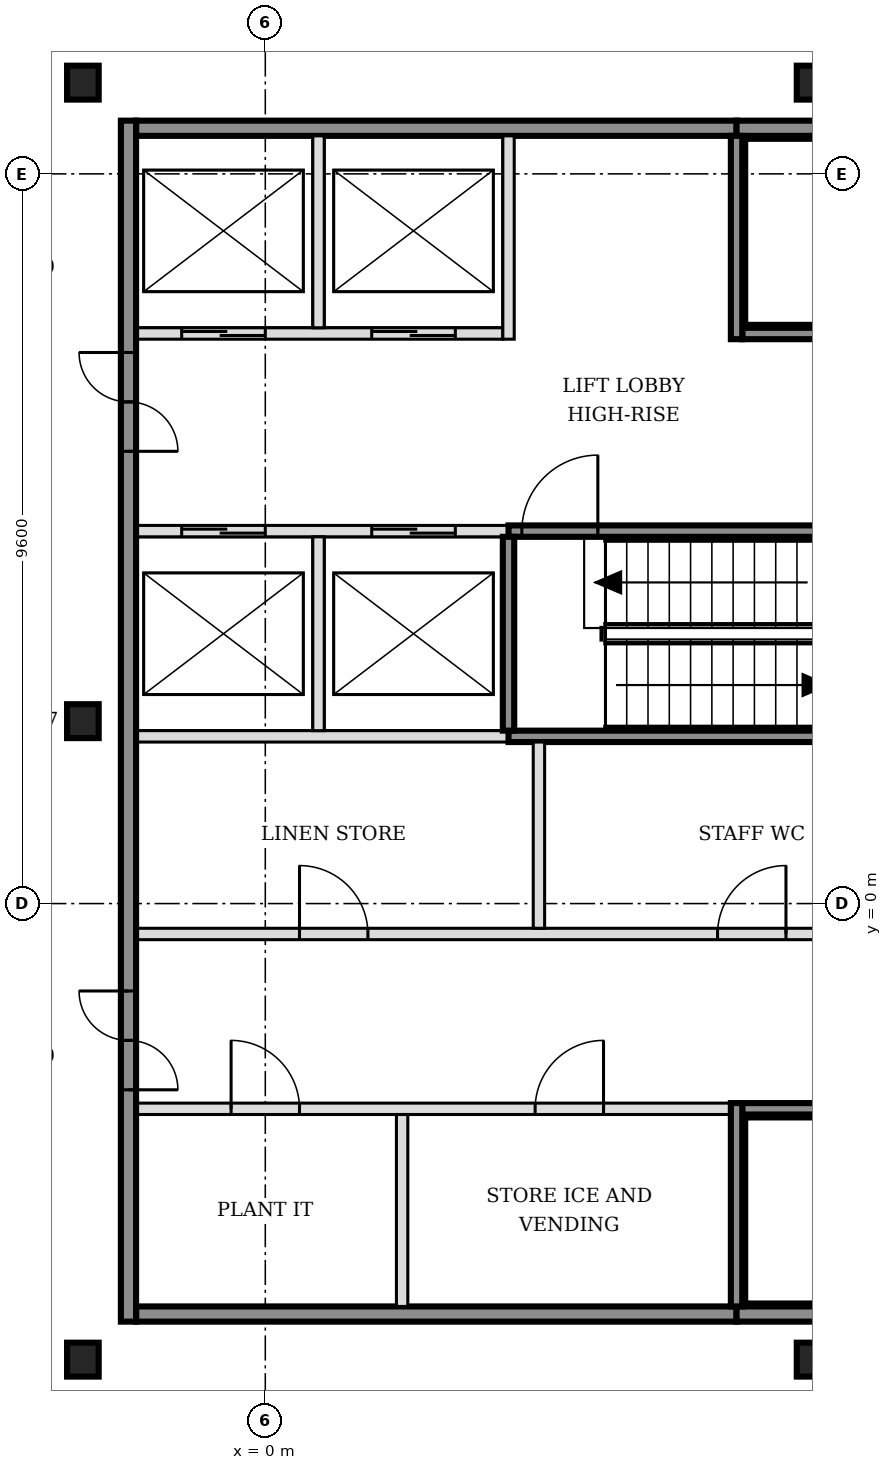
"""IFC4 building model, lengths in metres.
Left out: names, types, materials, properties, quantities, classifications, styles, units other than length and angle.
Written with IfcOpenShell. Run it as: python <this file> out.ifc"""

import sys

from ifc_helpers import new_model, si_unit, direction, frame, frame_2d, origin, origin_2d, place, context, subcontext, project, spatial, rectangle, i_section, extrude, element, fill, save


model = new_model("IFC4")
c1 = context("Model", 3, precision=1e-05, world=origin(), true_north=direction((0.0, 1.0)))
c2 = subcontext(c1, "Body", "Model", "MODEL_VIEW")
j1 = project(units=[si_unit("LENGTHUNIT", "METRE"), si_unit("PLANEANGLEUNIT", "RADIAN")], contexts=[c1])
p1 = place(None, origin())
s1 = spatial("IfcSite", under=j1, at=p1, CompositionType="ELEMENT")
p2 = place(p1, origin())
s2 = spatial("IfcBuilding", under=s1, at=p2, CompositionType="ELEMENT")
p3 = place(p2, frame((0.0, 0.0, 165.0)))
s3 = spatial("IfcBuildingStorey", under=s2, at=p3, CompositionType="ELEMENT", Elevation=165.0)
for number, where, z_axis, x_axis in (
    (1, (-2.4, -6.0, -0.15), (0.0, 0.0, 1.0), (1.0, 0.0, 0.0)),
    (2, (7.2, -6.0, -0.15), (0.0, 0.0, 1.0), (1.0, 0.0, 0.0)),
    (3, (-2.4, 2.4, -0.15), (0.0, 0.0, 1.0), (1.0, 0.0, 0.0)),
    (4, (-2.4, 10.8, -0.15), (0.0, 0.0, 1.0), (1.0, 0.0, 0.0)),
    (5, (7.2, 10.8, -0.15), (0.0, 0.0, 1.0), (1.0, 0.0, 0.0)),
):
    element("IfcColumn", number, at=place(p3, frame(where, z_axis=z_axis, x_axis=x_axis)), inside=s3, PredefinedType="COLUMN", context=c2, shape_type="SweptSolid", body=[
        extrude(i_section(OverallWidth=0.416, OverallDepth=0.446, WebThickness=0.039, FlangeThickness=0.063, FilletRadius=0.015, at=origin_2d()), origin(), (0.0, 0.0, 1.0), 3.6),
    ])
p4 = place(p3, frame((-1.7, -5.4, 0.0), z_axis=(0.0, 0.0, 1.0), x_axis=(1.0, 0.0, 0.0)))
e6 = element("IfcWall", 6, at=p4, inside=s3, PredefinedType="SOLIDWALL", context=c2, shape_type="SweptSolid", body=[
    extrude(rectangle(XDim=7.9, YDim=0.2, at=frame_2d((3.95, 0.0))), origin(), (0.0, 0.0, 1.0), 3.45),
])
p5 = place(p3, frame((6.2, -5.4, 0.0), z_axis=(0.0, 0.0, 1.0), x_axis=(1.0, 0.0, 0.0)))
e7 = element("IfcWall", 7, at=p5, inside=s3, PredefinedType="SOLIDWALL", context=c2, shape_type="SweptSolid", body=[
    extrude(rectangle(XDim=6.5, YDim=0.2, at=frame_2d((3.25, 0.0))), origin(), (0.0, 0.0, 1.0), 3.45),
])
p6 = place(p3, frame((-1.7, -2.7, 0.0), z_axis=(0.0, 0.0, 1.0), x_axis=(1.0, 0.0, 0.0)))
e8 = element("IfcWall", 8, at=p6, inside=s3, PredefinedType="PARTITIONING", context=c2, shape_type="SweptSolid", body=[
    extrude(rectangle(XDim=7.825, YDim=0.15, at=frame_2d((3.913, 0.0))), origin(), (0.0, 0.0, 1.0), 3.45),
])
p7 = place(p6, frame((1.25, 0.0, 0.0)))
e9 = element("IfcOpeningElement", 9, at=p7, cuts=e8, PredefinedType="OPENING", context=c2, shape_type="SweptSolid", body=[
    extrude(rectangle(XDim=0.9, YDim=2.1, at=frame_2d((0.45, 1.05))), frame((0.0, 0.085, 0.0), z_axis=(0.0, -1.0, 0.0), x_axis=(1.0, 0.0, 0.0)), (0.0, 0.0, 1.0), 0.17),
])
p8 = place(p6, frame((5.25, 0.0, 0.0)))
e10 = element("IfcOpeningElement", 10, at=p8, cuts=e8, PredefinedType="OPENING", context=c2, shape_type="SweptSolid", body=[
    extrude(rectangle(XDim=0.9, YDim=2.1, at=frame_2d((0.45, 1.05))), frame((0.0, 0.085, 0.0), z_axis=(0.0, -1.0, 0.0), x_axis=(1.0, 0.0, 0.0)), (0.0, 0.0, 1.0), 0.17),
])
p9 = place(p3, frame((6.275, -2.7, 0.0), z_axis=(0.0, 0.0, 1.0), x_axis=(1.0, 0.0, 0.0)))
e11 = element("IfcWall", 11, at=p9, inside=s3, PredefinedType="SOLIDWALL", context=c2, shape_type="SweptSolid", body=[
    extrude(rectangle(XDim=6.35, YDim=0.15, at=frame_2d((3.175, 0.0))), origin(), (0.0, 0.0, 1.0), 3.45),
])
p10 = place(p9, frame((5.225, 0.0, 0.0)))
e12 = element("IfcOpeningElement", 12, at=p10, cuts=e11, PredefinedType="OPENING", context=c2, shape_type="SweptSolid", body=[
    extrude(rectangle(XDim=1.0, YDim=2.1, at=frame_2d((0.5, 1.05))), frame((0.0, 0.085, 0.0), z_axis=(0.0, -1.0, 0.0), x_axis=(1.0, 0.0, 0.0)), (0.0, 0.0, 1.0), 0.17),
])
p11 = place(p3, frame((-1.7, -0.4, 0.0), z_axis=(0.0, 0.0, 1.0), x_axis=(1.0, 0.0, 0.0)))
e13 = element("IfcWall", 13, at=p11, inside=s3, PredefinedType="PARTITIONING", context=c2, shape_type="SweptSolid", body=[
    extrude(rectangle(XDim=10.825, YDim=0.15, at=frame_2d((5.413, 0.0))), origin(), (0.0, 0.0, 1.0), 3.45),
])
p12 = place(p11, frame((2.15, 0.0, 0.0)))
e14 = element("IfcOpeningElement", 14, at=p12, cuts=e13, PredefinedType="OPENING", context=c2, shape_type="SweptSolid", body=[
    extrude(rectangle(XDim=0.9, YDim=2.1, at=frame_2d((0.45, 1.05))), frame((0.0, 0.085, 0.0), z_axis=(0.0, -1.0, 0.0), x_axis=(1.0, 0.0, 0.0)), (0.0, 0.0, 1.0), 0.17),
])
p13 = place(p11, frame((7.65, 0.0, 0.0)))
e15 = element("IfcOpeningElement", 15, at=p13, cuts=e13, PredefinedType="OPENING", context=c2, shape_type="SweptSolid", body=[
    extrude(rectangle(XDim=0.9, YDim=2.1, at=frame_2d((0.45, 1.05))), frame((0.0, 0.085, 0.0), z_axis=(0.0, -1.0, 0.0), x_axis=(1.0, 0.0, 0.0)), (0.0, 0.0, 1.0), 0.17),
])
p14 = place(p3, frame((-1.7, 2.2, 0.0), z_axis=(0.0, 0.0, 1.0), x_axis=(1.0, 0.0, 0.0)))
e16 = element("IfcWall", 16, at=p14, inside=s3, PredefinedType="SOLIDWALL", context=c2, shape_type="SweptSolid", body=[
    extrude(rectangle(XDim=4.9, YDim=0.15, at=frame_2d((2.45, 0.0))), origin(), (0.0, 0.0, 1.0), 3.45),
])
p15 = place(p3, frame((3.2, 2.2, 0.0), z_axis=(0.0, 0.0, 1.0), x_axis=(1.0, 0.0, 0.0)))
e17 = element("IfcWall", 17, at=p15, inside=s3, PredefinedType="SOLIDWALL", context=c2, shape_type="SweptSolid", body=[
    extrude(rectangle(XDim=6.5, YDim=0.15, at=frame_2d((3.25, 0.0))), origin(), (0.0, 0.0, 1.0), 3.45),
])
p16 = place(p3, frame((-1.7, 4.9, 0.0), z_axis=(0.0, 0.0, 1.0), x_axis=(1.0, 0.0, 0.0)))
e18 = element("IfcWall", 18, at=p16, inside=s3, PredefinedType="SOLIDWALL", context=c2, shape_type="SweptSolid", body=[
    extrude(rectangle(XDim=4.9, YDim=0.15, at=frame_2d((2.45, 0.0))), origin(), (0.0, 0.0, 1.0), 3.45),
])
p17 = place(p16, frame((0.6, 0.0, 0.0)))
e19 = element("IfcOpeningElement", 19, at=p17, cuts=e18, PredefinedType="OPENING", context=c2, shape_type="SweptSolid", body=[
    extrude(rectangle(XDim=1.1, YDim=2.1, at=frame_2d((0.55, 1.05))), frame((0.0, 0.085, 0.0), z_axis=(0.0, -1.0, 0.0), x_axis=(1.0, 0.0, 0.0)), (0.0, 0.0, 1.0), 0.17),
])
p18 = place(p16, frame((3.1, 0.0, 0.0)))
e20 = element("IfcOpeningElement", 20, at=p18, cuts=e18, PredefinedType="OPENING", context=c2, shape_type="SweptSolid", body=[
    extrude(rectangle(XDim=1.1, YDim=2.1, at=frame_2d((0.55, 1.05))), frame((0.0, 0.085, 0.0), z_axis=(0.0, -1.0, 0.0), x_axis=(1.0, 0.0, 0.0)), (0.0, 0.0, 1.0), 0.17),
])
p19 = place(p3, frame((3.2, 4.9, 0.0), z_axis=(0.0, 0.0, 1.0), x_axis=(1.0, 0.0, 0.0)))
e21 = element("IfcWall", 21, at=p19, inside=s3, PredefinedType="SOLIDWALL", context=c2, shape_type="SweptSolid", body=[
    extrude(rectangle(XDim=6.5, YDim=0.15, at=frame_2d((3.25, 0.0))), origin(), (0.0, 0.0, 1.0), 3.45),
])
p20 = place(p19, frame((0.175, 0.0, 0.0)))
e22 = element("IfcOpeningElement", 22, at=p20, cuts=e21, PredefinedType="OPENING", context=c2, shape_type="SweptSolid", body=[
    extrude(rectangle(XDim=1.0, YDim=2.1, at=frame_2d((0.5, 1.05))), frame((0.0, 0.085, 0.0), z_axis=(0.0, -1.0, 0.0), x_axis=(1.0, 0.0, 0.0)), (0.0, 0.0, 1.0), 0.17),
])
p21 = place(p3, frame((-1.7, 7.5, 0.0), z_axis=(0.0, 0.0, 1.0), x_axis=(1.0, 0.0, 0.0)))
e23 = element("IfcWall", 23, at=p21, inside=s3, PredefinedType="SOLIDWALL", context=c2, shape_type="SweptSolid", body=[
    extrude(rectangle(XDim=4.825, YDim=0.15, at=frame_2d((2.413, 0.0))), origin(), (0.0, 0.0, 1.0), 3.45),
])
p22 = place(p21, frame((0.6, 0.0, 0.0)))
e24 = element("IfcOpeningElement", 24, at=p22, cuts=e23, PredefinedType="OPENING", context=c2, shape_type="SweptSolid", body=[
    extrude(rectangle(XDim=1.1, YDim=2.1, at=frame_2d((0.55, 1.05))), frame((0.0, 0.085, 0.0), z_axis=(0.0, -1.0, 0.0), x_axis=(1.0, 0.0, 0.0)), (0.0, 0.0, 1.0), 0.17),
])
p23 = place(p21, frame((3.1, 0.0, 0.0)))
e25 = element("IfcOpeningElement", 25, at=p23, cuts=e23, PredefinedType="OPENING", context=c2, shape_type="SweptSolid", body=[
    extrude(rectangle(XDim=1.1, YDim=2.1, at=frame_2d((0.55, 1.05))), frame((0.0, 0.085, 0.0), z_axis=(0.0, -1.0, 0.0), x_axis=(1.0, 0.0, 0.0)), (0.0, 0.0, 1.0), 0.17),
])
p24 = place(p3, frame((6.275, 7.5, 0.0), z_axis=(0.0, 0.0, 1.0), x_axis=(1.0, 0.0, 0.0)))
e26 = element("IfcWall", 26, at=p24, inside=s3, PredefinedType="SOLIDWALL", context=c2, shape_type="SweptSolid", body=[
    extrude(rectangle(XDim=6.425, YDim=0.15, at=frame_2d((3.212, 0.0))), origin(), (0.0, 0.0, 1.0), 3.45),
])
p25 = place(p24, frame((5.225, 0.0, 0.0)))
e27 = element("IfcOpeningElement", 27, at=p25, cuts=e26, PredefinedType="OPENING", context=c2, shape_type="SweptSolid", body=[
    extrude(rectangle(XDim=1.0, YDim=2.1, at=frame_2d((0.5, 1.05))), frame((0.0, 0.085, 0.0), z_axis=(0.0, -1.0, 0.0), x_axis=(1.0, 0.0, 0.0)), (0.0, 0.0, 1.0), 0.17),
])
p26 = place(p3, frame((-1.7, 10.2, 0.0), z_axis=(0.0, 0.0, 1.0), x_axis=(1.0, 0.0, 0.0)))
e28 = element("IfcWall", 28, at=p26, inside=s3, PredefinedType="SOLIDWALL", context=c2, shape_type="SweptSolid", body=[
    extrude(rectangle(XDim=7.9, YDim=0.2, at=frame_2d((3.95, 0.0))), origin(), (0.0, 0.0, 1.0), 3.45),
])
p27 = place(p3, frame((6.2, 10.2, 0.0), z_axis=(0.0, 0.0, 1.0), x_axis=(1.0, 0.0, 0.0)))
e29 = element("IfcWall", 29, at=p27, inside=s3, PredefinedType="SOLIDWALL", context=c2, shape_type="SweptSolid", body=[
    extrude(rectangle(XDim=6.5, YDim=0.2, at=frame_2d((3.25, 0.0))), origin(), (0.0, 0.0, 1.0), 3.45),
])
p28 = place(p3, frame((-1.8, -5.5, 0.0), z_axis=(0.0, 0.0, 1.0), x_axis=(0.0, 1.0, 0.0)))
e30 = element("IfcWall", 30, at=p28, inside=s3, PredefinedType="SOLIDWALL", context=c2, shape_type="SweptSolid", body=[
    extrude(rectangle(XDim=15.8, YDim=0.2, at=frame_2d((7.9, 0.0))), origin(), (0.0, 0.0, 1.0), 3.45),
])
p29 = place(p28, frame((3.05, 0.0, 0.0)))
e31 = element("IfcOpeningElement", 31, at=p29, cuts=e30, PredefinedType="OPENING", context=c2, shape_type="SweptSolid", body=[
    extrude(rectangle(XDim=1.3, YDim=2.1, at=frame_2d((0.65, 1.05))), frame((0.0, 0.11, 0.0), z_axis=(0.0, -1.0, 0.0), x_axis=(1.0, 0.0, 0.0)), (0.0, 0.0, 1.0), 0.22),
])
p30 = place(p28, frame((11.45, 0.0, 0.0)))
e32 = element("IfcOpeningElement", 32, at=p30, cuts=e30, PredefinedType="OPENING", context=c2, shape_type="SweptSolid", body=[
    extrude(rectangle(XDim=1.3, YDim=2.1, at=frame_2d((0.65, 1.05))), frame((0.0, 0.11, 0.0), z_axis=(0.0, -1.0, 0.0), x_axis=(1.0, 0.0, 0.0)), (0.0, 0.0, 1.0), 0.22),
])
p31 = place(p3, frame((0.7, 2.275, 0.0), z_axis=(0.0, 0.0, 1.0), x_axis=(0.0, 1.0, 0.0)))
e33 = element("IfcWall", 33, at=p31, inside=s3, PredefinedType="SOLIDWALL", context=c2, shape_type="SweptSolid", body=[
    extrude(rectangle(XDim=2.55, YDim=0.15, at=frame_2d((1.275, 0.0))), origin(), (0.0, 0.0, 1.0), 3.45),
])
p32 = place(p3, frame((0.7, 7.575, 0.0), z_axis=(0.0, 0.0, 1.0), x_axis=(0.0, 1.0, 0.0)))
e34 = element("IfcWall", 34, at=p32, inside=s3, PredefinedType="SOLIDWALL", context=c2, shape_type="SweptSolid", body=[
    extrude(rectangle(XDim=2.525, YDim=0.15, at=frame_2d((1.263, 0.0))), origin(), (0.0, 0.0, 1.0), 3.45),
])
p33 = place(p3, frame((1.8, -5.3, 0.0), z_axis=(0.0, 0.0, 1.0), x_axis=(0.0, 1.0, 0.0)))
e35 = element("IfcWall", 35, at=p33, inside=s3, PredefinedType="PARTITIONING", context=c2, shape_type="SweptSolid", body=[
    extrude(rectangle(XDim=2.525, YDim=0.15, at=frame_2d((1.263, 0.0))), origin(), (0.0, 0.0, 1.0), 3.45),
])
p34 = place(p3, frame((3.2, 2.275, 0.0), z_axis=(0.0, 0.0, 1.0), x_axis=(0.0, 1.0, 0.0)))
e36 = element("IfcWall", 36, at=p34, inside=s3, PredefinedType="SOLIDWALL", context=c2, shape_type="SweptSolid", body=[
    extrude(rectangle(XDim=2.55, YDim=0.15, at=frame_2d((1.275, 0.0))), origin(), (0.0, 0.0, 1.0), 3.45),
])
p35 = place(p3, frame((3.2, 7.425, 0.0), z_axis=(0.0, 0.0, 1.0), x_axis=(0.0, 1.0, 0.0)))
e37 = element("IfcWall", 37, at=p35, inside=s3, PredefinedType="SOLIDWALL", context=c2, shape_type="SweptSolid", body=[
    extrude(rectangle(XDim=2.675, YDim=0.15, at=frame_2d((1.337, 0.0))), origin(), (0.0, 0.0, 1.0), 3.45),
])
p36 = place(p3, frame((3.6, -0.325, 0.0), z_axis=(0.0, 0.0, 1.0), x_axis=(0.0, 1.0, 0.0)))
e38 = element("IfcWall", 38, at=p36, inside=s3, PredefinedType="PARTITIONING", context=c2, shape_type="SweptSolid", body=[
    extrude(rectangle(XDim=2.45, YDim=0.15, at=frame_2d((1.225, 0.0))), origin(), (0.0, 0.0, 1.0), 3.45),
])
for number, where, z_axis, x_axis in (
    (39, (6.2, -5.3, 0.0), (0.0, 0.0, 1.0), (0.0, 1.0, 0.0)),
    (40, (6.2, 7.425, 0.0), (0.0, 0.0, 1.0), (0.0, 1.0, 0.0)),
):
    element("IfcWall", number, at=place(p3, frame(where, z_axis=z_axis, x_axis=x_axis)), inside=s3, PredefinedType="SOLIDWALL", context=c2, shape_type="SweptSolid", body=[
        extrude(rectangle(XDim=2.675, YDim=0.15, at=frame_2d((1.337, 0.0))), origin(), (0.0, 0.0, 1.0), 3.45),
    ])
p37 = place(p17, origin())
e41 = element("IfcDoor", 41, at=p37, inside=s3, OperationType="DOUBLE_DOOR_SLIDING", PredefinedType="DOOR", context=c2, shape_type="SweptSolid", body=[
    extrude(rectangle(XDim=1.1, YDim=2.1, at=frame_2d((0.55, 1.05))), frame((0.0, 0.025, 0.0), z_axis=(0.0, -1.0, 0.0), x_axis=(1.0, 0.0, 0.0)), (0.0, 0.0, 1.0), 0.05),
])
fill(e19, e41)
p38 = place(p18, origin())
e42 = element("IfcDoor", 42, at=p38, inside=s3, OperationType="DOUBLE_DOOR_SLIDING", PredefinedType="DOOR", context=c2, shape_type="SweptSolid", body=[
    extrude(rectangle(XDim=1.1, YDim=2.1, at=frame_2d((0.55, 1.05))), frame((0.0, 0.025, 0.0), z_axis=(0.0, -1.0, 0.0), x_axis=(1.0, 0.0, 0.0)), (0.0, 0.0, 1.0), 0.05),
])
fill(e20, e42)
p39 = place(p22, origin())
e43 = element("IfcDoor", 43, at=p39, inside=s3, OperationType="DOUBLE_DOOR_SLIDING", PredefinedType="DOOR", context=c2, shape_type="SweptSolid", body=[
    extrude(rectangle(XDim=1.1, YDim=2.1, at=frame_2d((0.55, 1.05))), frame((0.0, 0.025, 0.0), z_axis=(0.0, -1.0, 0.0), x_axis=(1.0, 0.0, 0.0)), (0.0, 0.0, 1.0), 0.05),
])
fill(e24, e43)
p40 = place(p23, origin())
e44 = element("IfcDoor", 44, at=p40, inside=s3, OperationType="DOUBLE_DOOR_SLIDING", PredefinedType="DOOR", context=c2, shape_type="SweptSolid", body=[
    extrude(rectangle(XDim=1.1, YDim=2.1, at=frame_2d((0.55, 1.05))), frame((0.0, 0.025, 0.0), z_axis=(0.0, -1.0, 0.0), x_axis=(1.0, 0.0, 0.0)), (0.0, 0.0, 1.0), 0.05),
])
fill(e25, e44)
p41 = place(p20, origin())
e45 = element("IfcDoor", 45, at=p41, inside=s3, OperationType="SINGLE_SWING_RIGHT", PredefinedType="DOOR", context=c2, shape_type="SweptSolid", body=[
    extrude(rectangle(XDim=1.0, YDim=2.1, at=frame_2d((0.5, 1.05))), frame((0.0, 0.025, 0.0), z_axis=(0.0, -1.0, 0.0), x_axis=(1.0, 0.0, 0.0)), (0.0, 0.0, 1.0), 0.05),
])
fill(e22, e45)
p42 = place(p29, origin())
e46 = element("IfcDoor", 46, at=p42, inside=s3, OperationType="DOUBLE_DOOR_SINGLE_SWING", PredefinedType="DOOR", context=c2, shape_type="SweptSolid", body=[
    extrude(rectangle(XDim=1.3, YDim=2.1, at=frame_2d((0.65, 1.05))), frame((0.0, 0.025, 0.0), z_axis=(0.0, -1.0, 0.0), x_axis=(1.0, 0.0, 0.0)), (0.0, 0.0, 1.0), 0.05),
])
fill(e31, e46)
p43 = place(p30, origin())
e47 = element("IfcDoor", 47, at=p43, inside=s3, OperationType="DOUBLE_DOOR_SINGLE_SWING", PredefinedType="DOOR", context=c2, shape_type="SweptSolid", body=[
    extrude(rectangle(XDim=1.3, YDim=2.1, at=frame_2d((0.65, 1.05))), frame((0.0, 0.025, 0.0), z_axis=(0.0, -1.0, 0.0), x_axis=(1.0, 0.0, 0.0)), (0.0, 0.0, 1.0), 0.05),
])
fill(e32, e47)
p44 = place(p7, origin())
e48 = element("IfcDoor", 48, at=p44, inside=s3, OperationType="SINGLE_SWING_LEFT", PredefinedType="DOOR", context=c2, shape_type="SweptSolid", body=[
    extrude(rectangle(XDim=0.9, YDim=2.1, at=frame_2d((0.45, 1.05))), frame((0.0, 0.025, 0.0), z_axis=(0.0, -1.0, 0.0), x_axis=(1.0, 0.0, 0.0)), (0.0, 0.0, 1.0), 0.05),
])
fill(e9, e48)
p45 = place(p8, origin())
e49 = element("IfcDoor", 49, at=p45, inside=s3, OperationType="SINGLE_SWING_RIGHT", PredefinedType="DOOR", context=c2, shape_type="SweptSolid", body=[
    extrude(rectangle(XDim=0.9, YDim=2.1, at=frame_2d((0.45, 1.05))), frame((0.0, 0.025, 0.0), z_axis=(0.0, -1.0, 0.0), x_axis=(1.0, 0.0, 0.0)), (0.0, 0.0, 1.0), 0.05),
])
fill(e10, e49)
p46 = place(p12, origin())
e50 = element("IfcDoor", 50, at=p46, inside=s3, OperationType="SINGLE_SWING_LEFT", PredefinedType="DOOR", context=c2, shape_type="SweptSolid", body=[
    extrude(rectangle(XDim=0.9, YDim=2.1, at=frame_2d((0.45, 1.05))), frame((0.0, 0.025, 0.0), z_axis=(0.0, -1.0, 0.0), x_axis=(1.0, 0.0, 0.0)), (0.0, 0.0, 1.0), 0.05),
])
fill(e14, e50)
p47 = place(p13, origin())
e51 = element("IfcDoor", 51, at=p47, inside=s3, OperationType="SINGLE_SWING_RIGHT", PredefinedType="DOOR", context=c2, shape_type="SweptSolid", body=[
    extrude(rectangle(XDim=0.9, YDim=2.1, at=frame_2d((0.45, 1.05))), frame((0.0, 0.025, 0.0), z_axis=(0.0, -1.0, 0.0), x_axis=(1.0, 0.0, 0.0)), (0.0, 0.0, 1.0), 0.05),
])
fill(e15, e51)
save(model, sys.argv[1])
